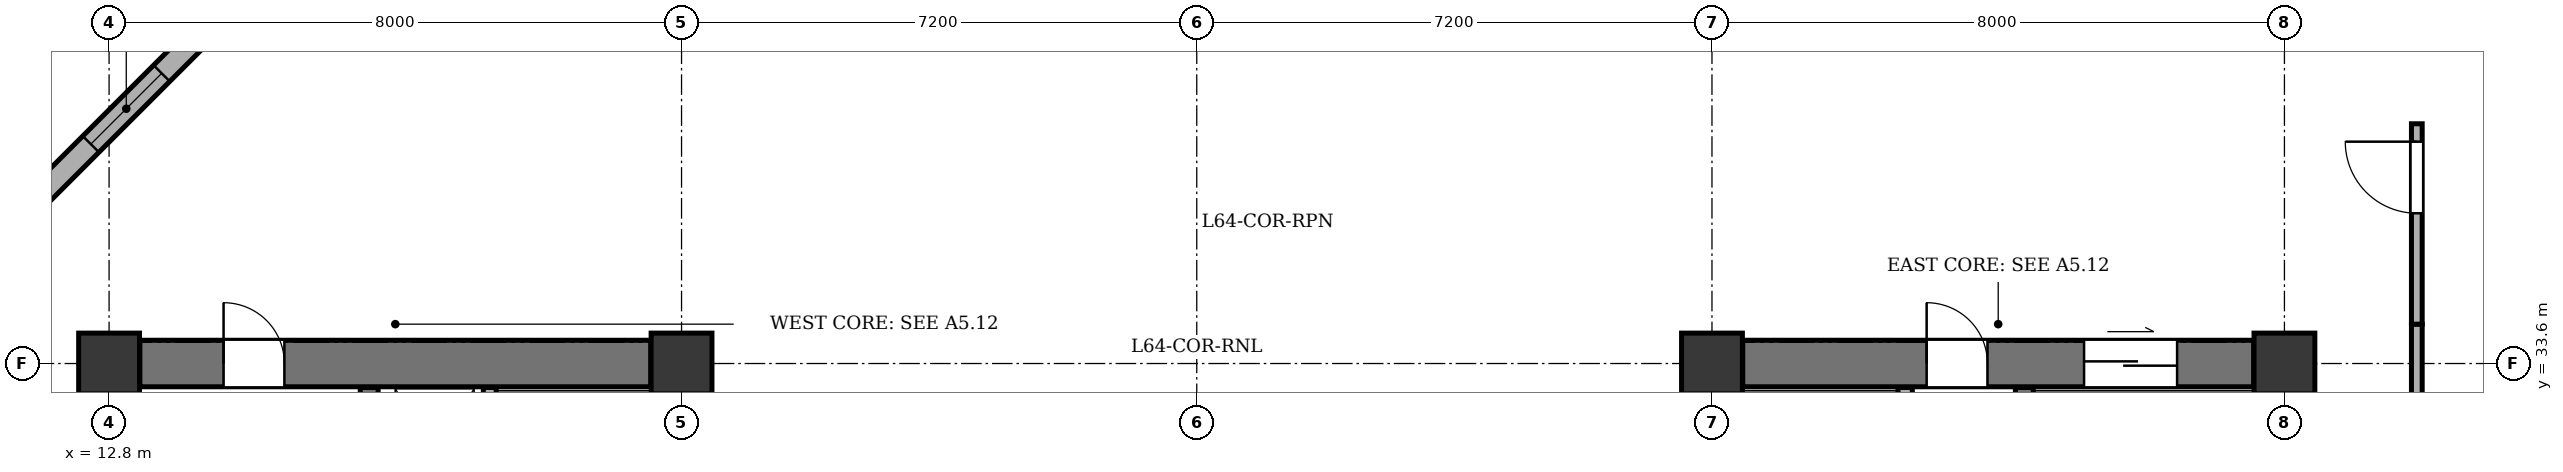
"""IFC4 building model, lengths in metres.
Left out: names, types, materials, properties, quantities, classifications, styles, units other than length and angle.
Written with IfcOpenShell. Run it as: python <this file> out.ifc"""

import sys

from ifc_helpers import new_model, si_unit, direction, frame, frame_2d, origin, origin_2d, place, context, subcontext, project, spatial, rectangle, extrude, element, fill, save


model = new_model("IFC4")
c1 = context("Model", 3, precision=1e-05, world=origin(), true_north=direction((0.0, 1.0)))
c2 = subcontext(c1, "Body", "Model", "MODEL_VIEW")
j1 = project(units=[si_unit("LENGTHUNIT", "METRE"), si_unit("PLANEANGLEUNIT", "RADIAN")], contexts=[c1])
p1 = place(None, origin())
s1 = spatial("IfcSite", under=j1, at=p1, CompositionType="ELEMENT")
p2 = place(p1, origin())
s2 = spatial("IfcBuilding", under=s1, at=p2, CompositionType="ELEMENT")
p3 = place(p2, frame((0.0, 0.0, 244.9)))
s3 = spatial("IfcBuildingStorey", under=s2, at=p3, CompositionType="ELEMENT", Elevation=244.9)
for number, where, z_axis, x_axis in (
    (1, (12.8, 33.6, 0.0), (0.0, 0.0, 1.0), (1.0, 0.0, 0.0)),
    (2, (20.8, 33.6, 0.0), (0.0, 0.0, 1.0), (1.0, 0.0, 0.0)),
    (3, (35.2, 33.6, 0.0), (0.0, 0.0, 1.0), (1.0, 0.0, 0.0)),
    (4, (43.2, 33.6, 0.0), (0.0, 0.0, 1.0), (1.0, 0.0, 0.0)),
):
    element("IfcColumn", number, at=place(p3, frame(where, z_axis=z_axis, x_axis=x_axis)), inside=s3, PredefinedType="COLUMN", context=c2, shape_type="SweptSolid", body=[
        extrude(rectangle(XDim=0.85, YDim=0.85, at=origin_2d()), origin(), (0.0, 0.0, 1.0), 3.4),
    ])
p4 = place(p3, frame((10.88, 35.0, 0.0), z_axis=(0.0, 0.0, 1.0), x_axis=(0.707106781187, 0.707106781187, 0.0)))
e5 = element("IfcWall", 5, at=p4, inside=s3, PredefinedType="STANDARD", context=c2, shape_type="SweptSolid", body=[
    extrude(rectangle(XDim=6.11, YDim=0.32, at=frame_2d((3.055, 0.0))), origin(), (0.0, 0.0, 1.0), 2.335),
])
p5 = place(p4, frame((2.355, 0.0, 0.75)))
e6 = element("IfcOpeningElement", 6, at=p5, cuts=e5, PredefinedType="OPENING", context=c2, shape_type="SweptSolid", body=[
    extrude(rectangle(XDim=1.4, YDim=1.465, at=frame_2d((0.7, 0.732))), frame((0.0, 0.17, 0.0), z_axis=(0.0, -1.0, 0.0), x_axis=(1.0, 0.0, 0.0)), (0.0, 0.0, 1.0), 0.34),
])
p6 = place(p3, frame((13.23, 33.6, 0.0), z_axis=(0.0, 0.0, 1.0), x_axis=(1.0, 0.0, 0.0)))
e7 = element("IfcWall", 7, at=p6, inside=s3, PredefinedType="SHEAR", context=c2, shape_type="SweptSolid", body=[
    extrude(rectangle(XDim=7.14, YDim=0.65, at=frame_2d((3.57, 0.0))), origin(), (0.0, 0.0, 1.0), 2.95),
])
p7 = place(p6, frame((1.17, 0.0, 0.0)))
e8 = element("IfcOpeningElement", 8, at=p7, cuts=e7, PredefinedType="OPENING", context=c2, shape_type="SweptSolid", body=[
    extrude(rectangle(XDim=0.85, YDim=2.02, at=frame_2d((0.425, 1.01))), frame((0.0, 0.335, 0.0), z_axis=(0.0, -1.0, 0.0), x_axis=(1.0, 0.0, 0.0)), (0.0, 0.0, 1.0), 0.67),
])
p8 = place(p3, frame((16.435, 21.135, 0.0), z_axis=(0.0, 0.0, 1.0), x_axis=(0.0, 1.0, 0.0)))
e9 = element("IfcWall", 9, at=p8, inside=s3, PredefinedType="SHEAR", context=c2, shape_type="SweptSolid", body=[
    extrude(rectangle(XDim=12.13, YDim=0.25, at=frame_2d((6.065, 0.0))), origin(), (0.0, 0.0, 1.0), 2.95),
])
p9 = place(p8, frame((0.515, 0.0, 0.0)))
e10 = element("IfcOpeningElement", 10, at=p9, cuts=e9, PredefinedType="OPENING", context=c2, shape_type="SweptSolid", body=[
    extrude(rectangle(XDim=1.2, YDim=2.15, at=frame_2d((0.6, 1.075))), frame((0.0, 0.135, 0.0), z_axis=(0.0, -1.0, 0.0), x_axis=(1.0, 0.0, 0.0)), (0.0, 0.0, 1.0), 0.27),
])
p10 = place(p8, frame((2.665, 0.0, 0.0)))
e11 = element("IfcOpeningElement", 11, at=p10, cuts=e9, PredefinedType="OPENING", context=c2, shape_type="SweptSolid", body=[
    extrude(rectangle(XDim=1.15, YDim=2.15, at=frame_2d((0.575, 1.075))), frame((0.0, 0.135, 0.0), z_axis=(0.0, -1.0, 0.0), x_axis=(1.0, 0.0, 0.0)), (0.0, 0.0, 1.0), 0.27),
])
p11 = place(p3, frame((18.12, 31.17, 0.0), z_axis=(0.0, 0.0, 1.0), x_axis=(0.0, 1.0, 0.0)))
e12 = element("IfcWall", 12, at=p11, inside=s3, PredefinedType="PARTITIONING", context=c2, shape_type="SweptSolid", body=[
    extrude(rectangle(XDim=2.095, YDim=0.18, at=frame_2d((1.047, 0.0))), origin(), (0.0, 0.0, 1.0), 2.95),
])
p12 = place(p3, frame((35.63, 33.6, 0.0), z_axis=(0.0, 0.0, 1.0), x_axis=(1.0, 0.0, 0.0)))
e13 = element("IfcWall", 13, at=p12, inside=s3, PredefinedType="SHEAR", context=c2, shape_type="SweptSolid", body=[
    extrude(rectangle(XDim=7.14, YDim=0.65, at=frame_2d((3.57, 0.0))), origin(), (0.0, 0.0, 1.0), 2.95),
])
p13 = place(p12, frame((4.77, 0.0, 0.0)))
e14 = element("IfcOpeningElement", 14, at=p13, cuts=e13, PredefinedType="OPENING", context=c2, shape_type="SweptSolid", body=[
    extrude(rectangle(XDim=1.3, YDim=2.15, at=frame_2d((0.65, 1.075))), frame((0.0, 0.335, 0.0), z_axis=(0.0, -1.0, 0.0), x_axis=(1.0, 0.0, 0.0)), (0.0, 0.0, 1.0), 0.67),
])
p14 = place(p12, frame((2.57, 0.0, 0.0)))
e15 = element("IfcOpeningElement", 15, at=p14, cuts=e13, PredefinedType="OPENING", context=c2, shape_type="SweptSolid", body=[
    extrude(rectangle(XDim=0.85, YDim=2.02, at=frame_2d((0.425, 1.01))), frame((0.0, 0.335, 0.0), z_axis=(0.0, -1.0, 0.0), x_axis=(1.0, 0.0, 0.0)), (0.0, 0.0, 1.0), 0.67),
])
p15 = place(p3, frame((39.565, 21.135, 0.0), z_axis=(0.0, 0.0, 1.0), x_axis=(0.0, 1.0, 0.0)))
e16 = element("IfcWall", 16, at=p15, inside=s3, PredefinedType="SHEAR", context=c2, shape_type="SweptSolid", body=[
    extrude(rectangle(XDim=12.13, YDim=0.25, at=frame_2d((6.065, 0.0))), origin(), (0.0, 0.0, 1.0), 2.95),
])
p16 = place(p15, frame((0.515, 0.0, 0.0)))
e17 = element("IfcOpeningElement", 17, at=p16, cuts=e16, PredefinedType="OPENING", context=c2, shape_type="SweptSolid", body=[
    extrude(rectangle(XDim=1.2, YDim=2.15, at=frame_2d((0.6, 1.075))), frame((0.0, 0.135, 0.0), z_axis=(0.0, -1.0, 0.0), x_axis=(1.0, 0.0, 0.0)), (0.0, 0.0, 1.0), 0.27),
])
p17 = place(p15, frame((2.665, 0.0, 0.0)))
e18 = element("IfcOpeningElement", 18, at=p17, cuts=e16, PredefinedType="OPENING", context=c2, shape_type="SweptSolid", body=[
    extrude(rectangle(XDim=1.15, YDim=2.15, at=frame_2d((0.575, 1.075))), frame((0.0, 0.135, 0.0), z_axis=(0.0, -1.0, 0.0), x_axis=(1.0, 0.0, 0.0)), (0.0, 0.0, 1.0), 0.27),
])
p18 = place(p3, frame((37.9, 25.27, 0.0), z_axis=(0.0, 0.0, 1.0), x_axis=(0.0, 1.0, 0.0)))
e19 = element("IfcWall", 19, at=p18, inside=s3, PredefinedType="SOLIDWALL", context=c2, shape_type="SweptSolid", body=[
    extrude(rectangle(XDim=7.995, YDim=0.2, at=frame_2d((3.998, 0.0))), origin(), (0.0, 0.0, 1.0), 2.95),
])
p19 = place(p3, frame((45.05, 20.25, 0.0), z_axis=(0.0, 0.0, 1.0), x_axis=(0.0, 1.0, 0.0)))
e20 = element("IfcWall", 20, at=p19, inside=s3, PredefinedType="PARTITIONING", context=c2, shape_type="SweptSolid", body=[
    extrude(rectangle(XDim=13.9, YDim=0.15, at=frame_2d((6.95, 0.0))), origin(), (0.0, 0.0, 1.0), 2.385),
])
p20 = place(p3, frame((45.05, 34.15, 0.0), z_axis=(0.0, 0.0, 1.0), x_axis=(0.0, 1.0, 0.0)))
e21 = element("IfcWall", 21, at=p20, inside=s3, PredefinedType="PARTITIONING", context=c2, shape_type="SweptSolid", body=[
    extrude(rectangle(XDim=2.8, YDim=0.15, at=frame_2d((1.4, 0.0))), origin(), (0.0, 0.0, 1.0), 2.385),
])
p21 = place(p20, frame((1.55, 0.0, 0.0)))
e22 = element("IfcOpeningElement", 22, at=p21, cuts=e21, PredefinedType="OPENING", context=c2, shape_type="SweptSolid", body=[
    extrude(rectangle(XDim=1.0, YDim=2.1, at=frame_2d((0.5, 1.05))), frame((0.0, 0.085, 0.0), z_axis=(0.0, -1.0, 0.0), x_axis=(1.0, 0.0, 0.0)), (0.0, 0.0, 1.0), 0.17),
])
p22 = place(p5, origin())
e23 = element("IfcWindow", 23, at=p22, inside=s3, PartitioningType="SINGLE_PANEL", PredefinedType="WINDOW", context=c2, shape_type="SweptSolid", body=[
    extrude(rectangle(XDim=1.4, YDim=1.465, at=frame_2d((0.7, 0.732))), frame((0.0, -0.01, 0.0), z_axis=(0.0, -1.0, 0.0), x_axis=(1.0, 0.0, 0.0)), (0.0, 0.0, 1.0), 0.06),
])
fill(e6, e23)
p23 = place(p7, origin())
e24 = element("IfcDoor", 24, at=p23, inside=s3, OperationType="SINGLE_SWING_LEFT", PredefinedType="DOOR", context=c2, shape_type="SweptSolid", body=[
    extrude(rectangle(XDim=0.85, YDim=2.02, at=frame_2d((0.425, 1.01))), frame((0.0, 0.025, 0.0), z_axis=(0.0, -1.0, 0.0), x_axis=(1.0, 0.0, 0.0)), (0.0, 0.0, 1.0), 0.05),
])
fill(e8, e24)
p24 = place(p13, origin())
e25 = element("IfcDoor", 25, at=p24, inside=s3, OperationType="DOUBLE_DOOR_SLIDING", PredefinedType="DOOR", context=c2, shape_type="SweptSolid", body=[
    extrude(rectangle(XDim=1.3, YDim=2.15, at=frame_2d((0.65, 1.075))), frame((0.0, 0.025, 0.0), z_axis=(0.0, -1.0, 0.0), x_axis=(1.0, 0.0, 0.0)), (0.0, 0.0, 1.0), 0.05),
])
fill(e14, e25)
p25 = place(p14, origin())
e26 = element("IfcDoor", 26, at=p25, inside=s3, OperationType="SINGLE_SWING_LEFT", PredefinedType="DOOR", context=c2, shape_type="SweptSolid", body=[
    extrude(rectangle(XDim=0.85, YDim=2.02, at=frame_2d((0.425, 1.01))), frame((0.0, 0.025, 0.0), z_axis=(0.0, -1.0, 0.0), x_axis=(1.0, 0.0, 0.0)), (0.0, 0.0, 1.0), 0.05),
])
fill(e15, e26)
p26 = place(p21, origin())
e27 = element("IfcDoor", 27, at=p26, inside=s3, OperationType="SINGLE_SWING_RIGHT", PredefinedType="DOOR", context=c2, shape_type="SweptSolid", body=[
    extrude(rectangle(XDim=1.0, YDim=2.1, at=frame_2d((0.5, 1.05))), frame((0.0, 0.025, 0.0), z_axis=(0.0, -1.0, 0.0), x_axis=(1.0, 0.0, 0.0)), (0.0, 0.0, 1.0), 0.05),
])
fill(e22, e27)
save(model, sys.argv[1])
